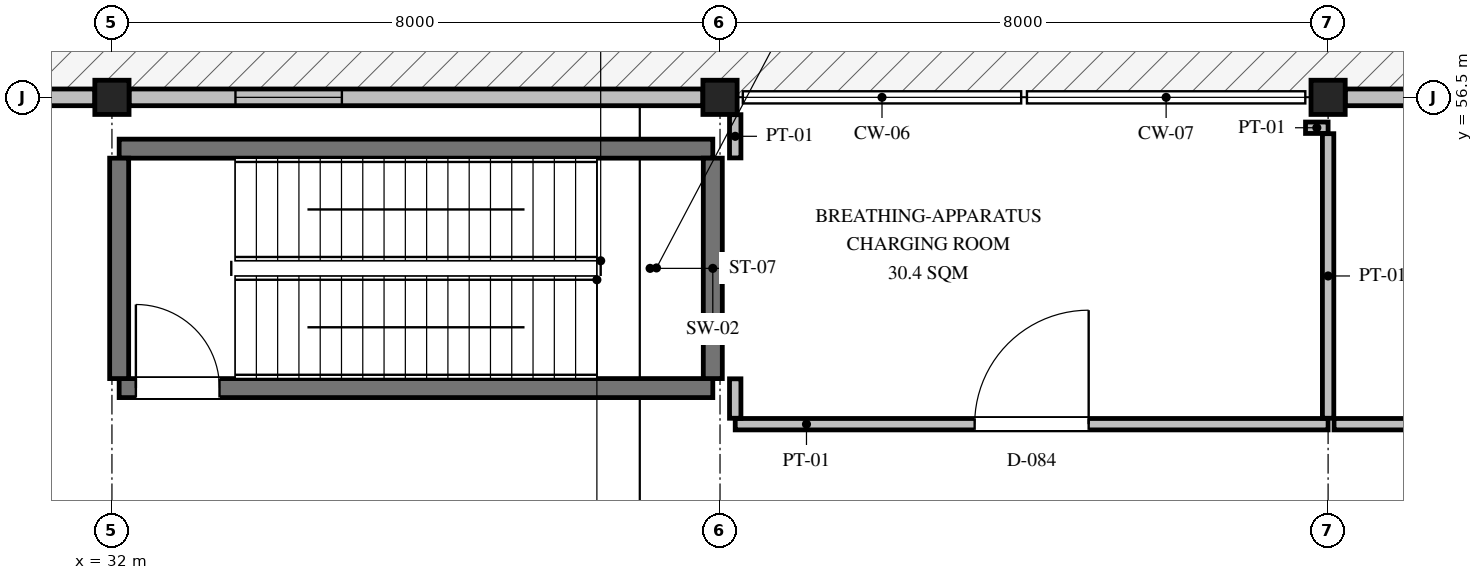
"""IFC4 building model, lengths in metres.
Left out: names, types, materials, properties, quantities, classifications, styles, units other than length and angle.
Written with IfcOpenShell. Run it as: python <this file> out.ifc"""

import sys

from ifc_helpers import new_model, si_unit, direction, frame, frame_2d, origin, origin_2d, place, context, subcontext, project, spatial, rectangle, hollow_rectangle, extrude, element, fill, save


model = new_model("IFC4")
c1 = context("Model", 3, precision=1e-05, world=origin(), true_north=direction((0.0, 1.0)))
c2 = subcontext(c1, "Body", "Model", "MODEL_VIEW")
j1 = project(units=[si_unit("LENGTHUNIT", "METRE"), si_unit("PLANEANGLEUNIT", "RADIAN")], contexts=[c1])
p1 = place(None, origin())
s1 = spatial("IfcSite", under=j1, at=p1, CompositionType="ELEMENT")
p2 = place(p1, origin())
s2 = spatial("IfcBuilding", under=s1, at=p2, CompositionType="ELEMENT")
p3 = place(p2, frame((0.0, 0.0, 0.45)))
s3 = spatial("IfcBuildingStorey", under=s2, at=p3, CompositionType="ELEMENT", Elevation=0.45)
for number, where, z_axis, x_axis in (
    (1, (32.0, 56.5, -0.45), (0.0, 0.0, 1.0), (1.0, 0.0, 0.0)),
    (2, (40.0, 56.5, -0.45), (0.0, 0.0, 1.0), (1.0, 0.0, 0.0)),
    (3, (48.0, 56.5, -0.45), (0.0, 0.0, 1.0), (1.0, 0.0, 0.0)),
):
    element("IfcColumn", number, at=place(p3, frame(where, z_axis=z_axis, x_axis=x_axis)), inside=s3, PredefinedType="COLUMN", context=c2, shape_type="SweptSolid", body=[
        extrude(hollow_rectangle(XDim=0.45, YDim=0.45, WallThickness=0.022, at=origin_2d()), origin(), (0.0, 0.0, 1.0), 5.85),
    ])
p4 = place(p3, frame((24.225, 56.5, 0.0), z_axis=(0.0, 0.0, 1.0), x_axis=(1.0, 0.0, 0.0)))
e4 = element("IfcWall", 4, at=p4, inside=s3, PredefinedType="SOLIDWALL", context=c2, shape_type="SweptSolid", body=[
    extrude(rectangle(XDim=7.55, YDim=0.22, at=frame_2d((3.775, 0.0))), origin(), (0.0, 0.0, 1.0), 4.694),
])
p5 = place(p4, frame((1.4, 0.0, 0.95)))
e5 = element("IfcOpeningElement", 5, at=p5, cuts=e4, PredefinedType="OPENING", context=c2, shape_type="SweptSolid", body=[
    extrude(rectangle(XDim=2.2, YDim=1.5, at=frame_2d((1.1, 0.75))), frame((0.0, 0.12, 0.0), z_axis=(0.0, -1.0, 0.0), x_axis=(1.0, 0.0, 0.0)), (0.0, 0.0, 1.0), 0.24),
])
p6 = place(p4, frame((4.4, 0.0, 0.95)))
e6 = element("IfcOpeningElement", 6, at=p6, cuts=e4, PredefinedType="OPENING", context=c2, shape_type="SweptSolid", body=[
    extrude(rectangle(XDim=1.8, YDim=2.1, at=frame_2d((0.9, 1.05))), frame((0.0, 0.12, 0.0), z_axis=(0.0, -1.0, 0.0), x_axis=(1.0, 0.0, 0.0)), (0.0, 0.0, 1.0), 0.24),
])
p7 = place(p3, frame((32.225, 56.5, 0.0), z_axis=(0.0, 0.0, 1.0), x_axis=(1.0, 0.0, 0.0)))
e7 = element("IfcWall", 7, at=p7, inside=s3, PredefinedType="SOLIDWALL", context=c2, shape_type="SweptSolid", body=[
    extrude(rectangle(XDim=7.55, YDim=0.22, at=frame_2d((3.775, 0.0))), origin(), (0.0, 0.0, 1.0), 4.094),
])
p8 = place(p7, frame((1.4, 0.0, 0.95)))
e8 = element("IfcOpeningElement", 8, at=p8, cuts=e7, PredefinedType="OPENING", context=c2, shape_type="SweptSolid", body=[
    extrude(rectangle(XDim=1.4, YDim=1.8, at=frame_2d((0.7, 0.9))), frame((0.0, 0.12, 0.0), z_axis=(0.0, -1.0, 0.0), x_axis=(1.0, 0.0, 0.0)), (0.0, 0.0, 1.0), 0.24),
])
p9 = place(p3, frame((48.225, 56.5, 0.0), z_axis=(0.0, 0.0, 1.0), x_axis=(1.0, 0.0, 0.0)))
e9 = element("IfcWall", 9, at=p9, inside=s3, PredefinedType="SOLIDWALL", context=c2, shape_type="SweptSolid", body=[
    extrude(rectangle(XDim=7.55, YDim=0.22, at=frame_2d((3.775, 0.0))), origin(), (0.0, 0.0, 1.0), 4.594),
])
p10 = place(p9, frame((1.4, 0.0, 0.95)))
e10 = element("IfcOpeningElement", 10, at=p10, cuts=e9, PredefinedType="OPENING", context=c2, shape_type="SweptSolid", body=[
    extrude(rectangle(XDim=2.6, YDim=1.8, at=frame_2d((1.3, 0.9))), frame((0.0, 0.12, 0.0), z_axis=(0.0, -1.0, 0.0), x_axis=(1.0, 0.0, 0.0)), (0.0, 0.0, 1.0), 0.24),
])
p11 = place(p9, frame((4.4, 0.0, 0.95)))
e11 = element("IfcOpeningElement", 11, at=p11, cuts=e9, PredefinedType="OPENING", context=c2, shape_type="SweptSolid", body=[
    extrude(rectangle(XDim=1.95, YDim=1.3, at=frame_2d((0.975, 0.65))), frame((0.0, 0.12, 0.0), z_axis=(0.0, -1.0, 0.0), x_axis=(1.0, 0.0, 0.0)), (0.0, 0.0, 1.0), 0.24),
])
p12 = place(p3, frame((32.095, 52.675, 0.0), z_axis=(0.0, 0.0, 1.0), x_axis=(1.0, 0.0, 0.0)))
e12 = element("IfcWall", 12, at=p12, inside=s3, PredefinedType="SHEAR", context=c2, shape_type="SweptSolid", body=[
    extrude(rectangle(XDim=7.81, YDim=0.25, at=frame_2d((3.905, 0.0))), origin(), (0.0, 0.0, 1.0), 5.2),
])
p13 = place(p12, frame((0.22, 0.0, 0.0)))
e13 = element("IfcOpeningElement", 13, at=p13, cuts=e12, PredefinedType="OPENING", context=c2, shape_type="SweptSolid", body=[
    extrude(rectangle(XDim=1.1, YDim=2.15, at=frame_2d((0.55, 1.075))), frame((0.0, 0.135, 0.0), z_axis=(0.0, -1.0, 0.0), x_axis=(1.0, 0.0, 0.0)), (0.0, 0.0, 1.0), 0.27),
])
p14 = place(p3, frame((32.095, 55.825, 0.0), z_axis=(0.0, 0.0, 1.0), x_axis=(1.0, 0.0, 0.0)))
e14 = element("IfcWall", 14, at=p14, inside=s3, PredefinedType="SHEAR", context=c2, shape_type="SweptSolid", body=[
    extrude(rectangle(XDim=7.81, YDim=0.25, at=frame_2d((3.905, 0.0))), origin(), (0.0, 0.0, 1.0), 5.2),
])
for number, where, z_axis, x_axis in (
    (15, (32.095, 52.8, 0.0), (0.0, 0.0, 1.0), (0.0, 1.0, 0.0)),
    (16, (39.905, 52.8, 0.0), (0.0, 0.0, 1.0), (0.0, 1.0, 0.0)),
):
    element("IfcWall", number, at=place(p3, frame(where, z_axis=z_axis, x_axis=x_axis)), inside=s3, PredefinedType="SHEAR", context=c2, shape_type="SweptSolid", body=[
        extrude(rectangle(XDim=2.9, YDim=0.25, at=frame_2d((1.45, 0.0))), origin(), (0.0, 0.0, 1.0), 5.2),
    ])
p15 = place(p3, frame((40.2, 52.2, 0.0), z_axis=(0.0, 0.0, 1.0), x_axis=(1.0, 0.0, 0.0)))
e17 = element("IfcWall", 17, at=p15, inside=s3, PredefinedType="PARTITIONING", context=c2, shape_type="SweptSolid", body=[
    extrude(rectangle(XDim=7.8, YDim=0.15, at=frame_2d((3.9, 0.0))), origin(), (0.0, 0.0, 1.0), 5.2),
])
p16 = place(p15, frame((3.15, 0.0, 0.0)))
e18 = element("IfcOpeningElement", 18, at=p16, cuts=e17, PredefinedType="OPENING", context=c2, shape_type="SweptSolid", body=[
    extrude(rectangle(XDim=1.5, YDim=2.25, at=frame_2d((0.75, 1.125))), frame((0.0, 0.085, 0.0), z_axis=(0.0, -1.0, 0.0), x_axis=(1.0, 0.0, 0.0)), (0.0, 0.0, 1.0), 0.17),
])
p17 = place(p3, frame((47.703, 56.1, 0.0), z_axis=(0.0, 0.0, 1.0), x_axis=(1.0, 0.0, 0.0)))
e19 = element("IfcWall", 19, at=p17, inside=s3, PredefinedType="PARTITIONING", context=c2, shape_type="SweptSolid", body=[
    extrude(rectangle(XDim=0.297, YDim=0.15, at=frame_2d((0.148, 0.0))), origin(), (0.0, 0.0, 1.0), 5.2),
])
p18 = place(p3, frame((40.2, 52.278, 0.0), z_axis=(0.0, 0.0, 1.0), x_axis=(0.0, 1.0, 0.0)))
e20 = element("IfcWall", 20, at=p18, inside=s3, PredefinedType="PARTITIONING", context=c2, shape_type="SweptSolid", body=[
    extrude(rectangle(XDim=0.519, YDim=0.15, at=frame_2d((0.26, 0.0))), origin(), (0.0, 0.0, 1.0), 5.2),
])
p19 = place(p3, frame((40.2, 55.703, 0.0), z_axis=(0.0, 0.0, 1.0), x_axis=(0.0, 1.0, 0.0)))
e21 = element("IfcWall", 21, at=p19, inside=s3, PredefinedType="PARTITIONING", context=c2, shape_type="SweptSolid", body=[
    extrude(rectangle(XDim=0.569, YDim=0.15, at=frame_2d((0.285, 0.0))), origin(), (0.0, 0.0, 1.0), 5.2),
])
p20 = place(p3, frame((48.0, 52.278, 0.0), z_axis=(0.0, 0.0, 1.0), x_axis=(0.0, 1.0, 0.0)))
e22 = element("IfcWall", 22, at=p20, inside=s3, PredefinedType="PARTITIONING", context=c2, shape_type="SweptSolid", body=[
    extrude(rectangle(XDim=3.744, YDim=0.15, at=frame_2d((1.872, 0.0))), origin(), (0.0, 0.0, 1.0), 4.744),
])
p21 = place(p3, frame((48.078, 52.2, 0.0), z_axis=(0.0, 0.0, 1.0), x_axis=(1.0, 0.0, 0.0)))
e23 = element("IfcWall", 23, at=p21, inside=s3, PredefinedType="PARTITIONING", context=c2, shape_type="SweptSolid", body=[
    extrude(rectangle(XDim=4.122, YDim=0.15, at=frame_2d((2.061, 0.0))), origin(), (0.0, 0.0, 1.0), 5.2),
])
p22 = place(p21, frame((1.621, 0.0, 0.0)))
e24 = element("IfcOpeningElement", 24, at=p22, cuts=e23, PredefinedType="OPENING", context=c2, shape_type="SweptSolid", body=[
    extrude(rectangle(XDim=0.88, YDim=2.1, at=frame_2d((0.44, 1.05))), frame((0.0, 0.085, 0.0), z_axis=(0.0, -1.0, 0.0), x_axis=(1.0, 0.0, 0.0)), (0.0, 0.0, 1.0), 0.17),
])
p23 = place(p8, origin())
e25 = element("IfcWindow", 25, at=p23, inside=s3, PartitioningType="SINGLE_PANEL", PredefinedType="WINDOW", context=c2, shape_type="SweptSolid", body=[
    extrude(rectangle(XDim=1.4, YDim=1.8, at=frame_2d((0.7, 0.9))), frame((0.0, 0.03, 0.0), z_axis=(0.0, -1.0, 0.0), x_axis=(1.0, 0.0, 0.0)), (0.0, 0.0, 1.0), 0.06),
])
fill(e8, e25)
p24 = place(p13, frame((1.1, 0.0, 0.0), z_axis=(0.0, 0.0, 1.0), x_axis=(-1.0, 0.0, 0.0)))
e26 = element("IfcDoor", 26, at=p24, inside=s3, OperationType="SINGLE_SWING_LEFT", PredefinedType="DOOR", context=c2, shape_type="SweptSolid", body=[
    extrude(rectangle(XDim=1.1, YDim=2.15, at=frame_2d((0.55, 1.075))), frame((0.0, 0.025, 0.0), z_axis=(0.0, -1.0, 0.0), x_axis=(1.0, 0.0, 0.0)), (0.0, 0.0, 1.0), 0.05),
])
fill(e13, e26)
p25 = place(p16, origin())
e27 = element("IfcDoor", 27, at=p25, inside=s3, OperationType="SINGLE_SWING_RIGHT", PredefinedType="DOOR", context=c2, shape_type="SweptSolid", body=[
    extrude(rectangle(XDim=1.5, YDim=2.25, at=frame_2d((0.75, 1.125))), frame((0.0, 0.025, 0.0), z_axis=(0.0, -1.0, 0.0), x_axis=(1.0, 0.0, 0.0)), (0.0, 0.0, 1.0), 0.05),
])
fill(e18, e27)
save(model, sys.argv[1])
